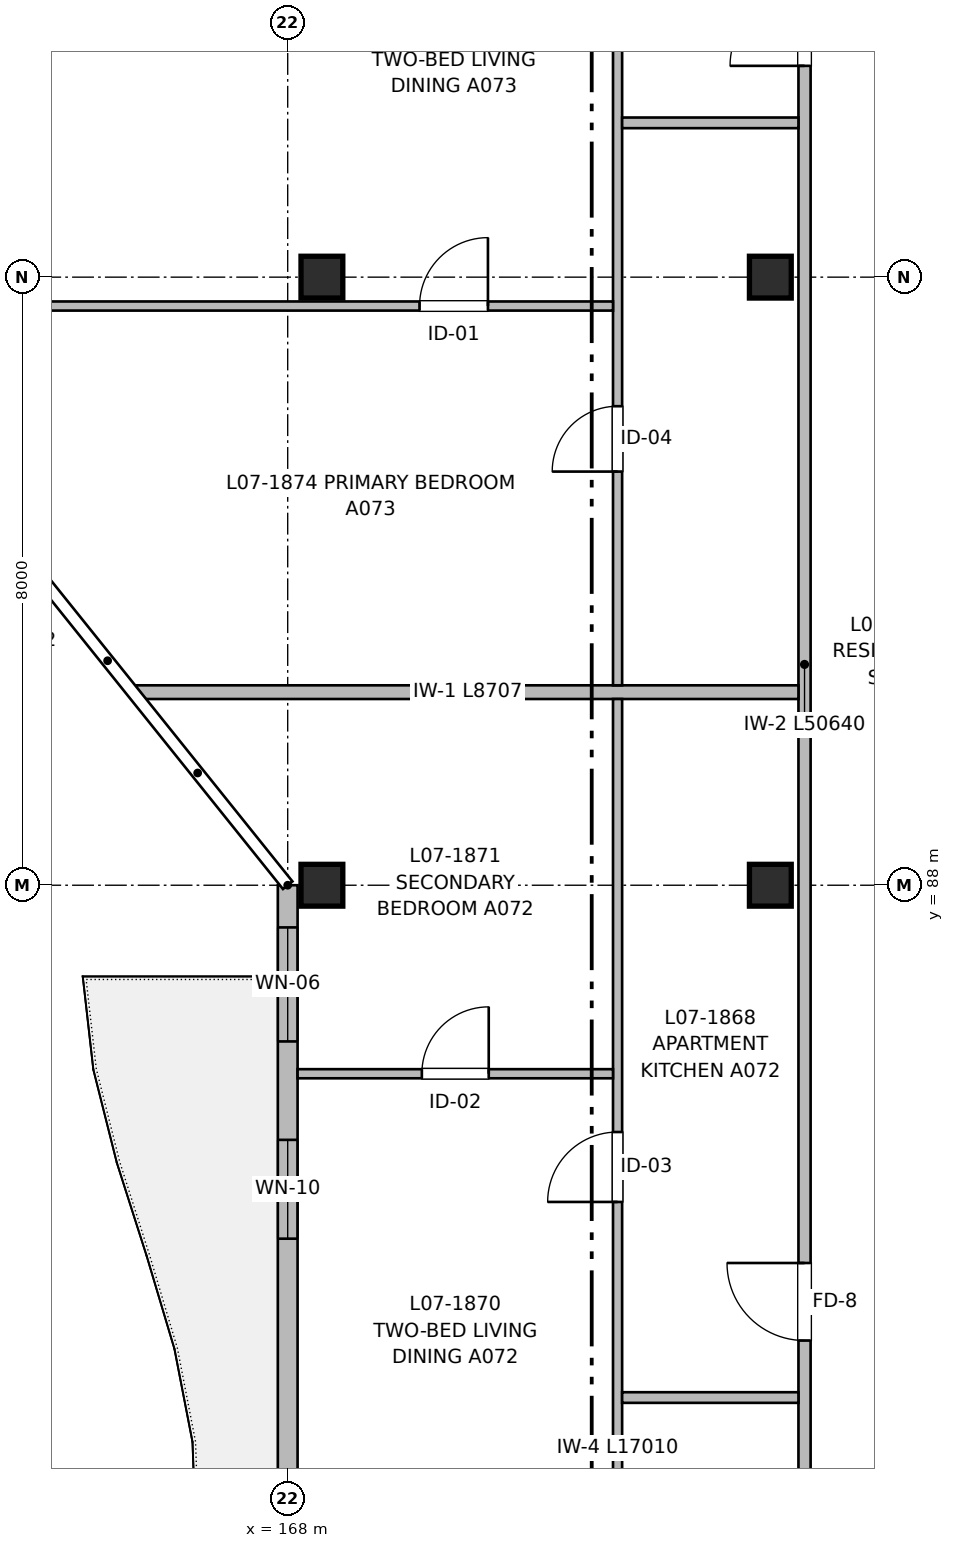
"""IFC4 building model, lengths in metres.
Left out: names, types, materials, properties, quantities, classifications, styles, units other than length and angle.
Written with IfcOpenShell. Run it as: python <this file> out.ifc"""

import sys

from ifc_helpers import new_model, si_unit, direction, frame, frame_2d, origin, origin_2d, place, context, subcontext, project, spatial, rectangle, extrude, element, fill, save


model = new_model("IFC4")
c1 = context("Model", 3, precision=1e-05, world=origin(), true_north=direction((0.0, 1.0)))
c2 = subcontext(c1, "Body", "Model", "MODEL_VIEW")
j1 = project(units=[si_unit("LENGTHUNIT", "METRE"), si_unit("PLANEANGLEUNIT", "RADIAN")], contexts=[c1])
p1 = place(None, origin())
s1 = spatial("IfcSite", under=j1, at=p1, CompositionType="ELEMENT")
p2 = place(p1, origin())
s2 = spatial("IfcBuilding", under=s1, at=p2, CompositionType="ELEMENT")
p3 = place(p2, frame((0.0, 0.0, 23.36)))
s3 = spatial("IfcBuildingStorey", under=s2, at=p3, CompositionType="ELEMENT", Elevation=23.36)
for number, where, z_axis, x_axis in (
    (1, (168.45, 88.0, 0.0), (0.0, 0.0, 1.0), (1.0, 0.0, 0.0)),
    (2, (168.45, 96.0, 0.0), (0.0, 0.0, 1.0), (1.0, 0.0, 0.0)),
    (3, (174.35, 88.0, 0.0), (0.0, 0.0, 1.0), (1.0, 0.0, 0.0)),
    (4, (174.35, 96.0, 0.0), (0.0, 0.0, 1.0), (1.0, 0.0, 0.0)),
):
    element("IfcColumn", number, at=place(p3, frame(where, z_axis=z_axis, x_axis=x_axis)), inside=s3, PredefinedType="COLUMN", context=c2, shape_type="SweptSolid", body=[
        extrude(rectangle(XDim=0.55, YDim=0.55, at=origin_2d()), origin(), (0.0, 0.0, 1.0), 3.2),
    ])
p4 = place(p3, frame((168.0, 56.0, 0.0), z_axis=(0.0, 0.0, 1.0), x_axis=(0.0, 1.0, 0.0)))
e5 = element("IfcWall", 5, at=p4, inside=s3, PredefinedType="SOLIDWALL", context=c2, shape_type="SweptSolid", body=[
    extrude(rectangle(XDim=32.0, YDim=0.26, at=frame_2d((16.0, 0.0))), origin(), (0.0, 0.0, 1.0), 2.98),
])
p5 = place(p4, frame((3.4, 0.0, 0.0)))
e6 = element("IfcOpeningElement", 6, at=p5, cuts=e5, PredefinedType="OPENING", context=c2, shape_type="SweptSolid", body=[
    extrude(rectangle(XDim=1.2, YDim=2.2, at=frame_2d((0.6, 1.1))), frame((0.0, 0.14, 0.0), z_axis=(0.0, -1.0, 0.0), x_axis=(1.0, 0.0, 0.0)), (0.0, 0.0, 1.0), 0.28),
])
p6 = place(p4, frame((5.75, 0.0, 0.77)))
e7 = element("IfcOpeningElement", 7, at=p6, cuts=e5, PredefinedType="OPENING", context=c2, shape_type="SweptSolid", body=[
    extrude(rectangle(XDim=1.45, YDim=1.45, at=frame_2d((0.725, 0.725))), frame((0.0, 0.14, 0.0), z_axis=(0.0, -1.0, 0.0), x_axis=(1.0, 0.0, 0.0)), (0.0, 0.0, 1.0), 0.28),
])
p7 = place(p4, frame((10.45, 0.0, 0.87)))
e8 = element("IfcOpeningElement", 8, at=p7, cuts=e5, PredefinedType="OPENING", context=c2, shape_type="SweptSolid", body=[
    extrude(rectangle(XDim=1.4, YDim=1.35, at=frame_2d((0.7, 0.675))), frame((0.0, 0.14, 0.0), z_axis=(0.0, -1.0, 0.0), x_axis=(1.0, 0.0, 0.0)), (0.0, 0.0, 1.0), 0.28),
])
p8 = place(p4, frame((19.375, 0.0, 0.87)))
e9 = element("IfcOpeningElement", 9, at=p8, cuts=e5, PredefinedType="OPENING", context=c2, shape_type="SweptSolid", body=[
    extrude(rectangle(XDim=1.25, YDim=1.35, at=frame_2d((0.625, 0.675))), frame((0.0, 0.14, 0.0), z_axis=(0.0, -1.0, 0.0), x_axis=(1.0, 0.0, 0.0)), (0.0, 0.0, 1.0), 0.28),
])
p9 = place(p4, frame((27.35, 0.0, 0.82)))
e10 = element("IfcOpeningElement", 10, at=p9, cuts=e5, PredefinedType="OPENING", context=c2, shape_type="SweptSolid", body=[
    extrude(rectangle(XDim=1.3, YDim=1.4, at=frame_2d((0.65, 0.7))), frame((0.0, 0.14, 0.0), z_axis=(0.0, -1.0, 0.0), x_axis=(1.0, 0.0, 0.0)), (0.0, 0.0, 1.0), 0.28),
])
p10 = place(p4, frame((14.055, 0.0, 0.82)))
e11 = element("IfcOpeningElement", 11, at=p10, cuts=e5, PredefinedType="OPENING", context=c2, shape_type="SweptSolid", body=[
    extrude(rectangle(XDim=1.5, YDim=1.4, at=frame_2d((0.75, 0.7))), frame((0.0, 0.14, 0.0), z_axis=(0.0, -1.0, 0.0), x_axis=(1.0, 0.0, 0.0)), (0.0, 0.0, 1.0), 0.28),
])
p11 = place(p4, frame((29.945, 0.0, 0.82)))
e12 = element("IfcOpeningElement", 12, at=p11, cuts=e5, PredefinedType="OPENING", context=c2, shape_type="SweptSolid", body=[
    extrude(rectangle(XDim=1.5, YDim=1.4, at=frame_2d((0.75, 0.7))), frame((0.0, 0.14, 0.0), z_axis=(0.0, -1.0, 0.0), x_axis=(1.0, 0.0, 0.0)), (0.0, 0.0, 1.0), 0.28),
])
p12 = place(p3, frame((174.8, 56.16, 0.0), z_axis=(0.0, 0.0, 1.0), x_axis=(0.0, 1.0, 0.0)))
e13 = element("IfcWall", 13, at=p12, inside=s3, PredefinedType="PARTITIONING", context=c2, shape_type="SweptSolid", body=[
    extrude(rectangle(XDim=50.64, YDim=0.16, at=frame_2d((25.32, 0.0))), origin(), (0.0, 0.0, 1.0), 2.935),
])
p13 = place(p12, frame((8.62, 0.0, 0.0)))
e14 = element("IfcOpeningElement", 14, at=p13, cuts=e13, PredefinedType="OPENING", context=c2, shape_type="SweptSolid", body=[
    extrude(rectangle(XDim=0.98, YDim=2.15, at=frame_2d((0.49, 1.075))), frame((0.0, 0.09, 0.0), z_axis=(0.0, -1.0, 0.0), x_axis=(1.0, 0.0, 0.0)), (0.0, 0.0, 1.0), 0.18),
])
p14 = place(p12, frame((25.85, 0.0, 0.0)))
e15 = element("IfcOpeningElement", 15, at=p14, cuts=e13, PredefinedType="OPENING", context=c2, shape_type="SweptSolid", body=[
    extrude(rectangle(XDim=1.02, YDim=2.15, at=frame_2d((0.51, 1.075))), frame((0.0, 0.09, 0.0), z_axis=(0.0, -1.0, 0.0), x_axis=(1.0, 0.0, 0.0)), (0.0, 0.0, 1.0), 0.18),
])
p15 = place(p12, frame((42.62, 0.0, 0.0)))
e16 = element("IfcOpeningElement", 16, at=p15, cuts=e13, PredefinedType="OPENING", context=c2, shape_type="SweptSolid", body=[
    extrude(rectangle(XDim=0.98, YDim=2.15, at=frame_2d((0.49, 1.075))), frame((0.0, 0.09, 0.0), z_axis=(0.0, -1.0, 0.0), x_axis=(1.0, 0.0, 0.0)), (0.0, 0.0, 1.0), 0.18),
])
p16 = place(p3, frame((166.013, 90.54, 0.0), z_axis=(0.0, 0.0, 1.0), x_axis=(1.0, 0.0, 0.0)))
e17 = element("IfcWall", 17, at=p16, inside=s3, PredefinedType="PARTITIONING", context=c2, shape_type="SweptSolid", body=[
    extrude(rectangle(XDim=8.707, YDim=0.18, at=frame_2d((4.353, 0.0))), origin(), (0.0, 0.0, 1.0), 2.935),
])
p17 = place(p3, frame((172.34, 73.44, 0.0), z_axis=(0.0, 0.0, 1.0), x_axis=(0.0, 1.0, 0.0)))
e18 = element("IfcWall", 18, at=p17, inside=s3, PredefinedType="PARTITIONING", context=c2, shape_type="SweptSolid", body=[
    extrude(rectangle(XDim=17.01, YDim=0.12, at=frame_2d((8.505, 0.0))), origin(), (0.0, 0.0, 1.0), 2.935),
])
p18 = place(p17, frame((2.972, 0.0, 0.0)))
e19 = element("IfcOpeningElement", 19, at=p18, cuts=e18, PredefinedType="OPENING", context=c2, shape_type="SweptSolid", body=[
    extrude(rectangle(XDim=0.94, YDim=2.1, at=frame_2d((0.47, 1.05))), frame((0.0, 0.07, 0.0), z_axis=(0.0, -1.0, 0.0), x_axis=(1.0, 0.0, 0.0)), (0.0, 0.0, 1.0), 0.14),
])
p19 = place(p17, frame((10.393, 0.0, 0.0)))
e20 = element("IfcOpeningElement", 20, at=p19, cuts=e18, PredefinedType="OPENING", context=c2, shape_type="SweptSolid", body=[
    extrude(rectangle(XDim=0.92, YDim=2.1, at=frame_2d((0.46, 1.05))), frame((0.0, 0.07, 0.0), z_axis=(0.0, -1.0, 0.0), x_axis=(1.0, 0.0, 0.0)), (0.0, 0.0, 1.0), 0.14),
])
p20 = place(p3, frame((172.4, 81.26, 0.0), z_axis=(0.0, 0.0, 1.0), x_axis=(1.0, 0.0, 0.0)))
e21 = element("IfcWall", 21, at=p20, inside=s3, PredefinedType="PARTITIONING", context=c2, shape_type="SweptSolid", body=[
    extrude(rectangle(XDim=2.32, YDim=0.14, at=frame_2d((1.16, 0.0))), origin(), (0.0, 0.0, 1.0), 2.935),
])
p21 = place(p3, frame((168.13, 85.52, 0.0), z_axis=(0.0, 0.0, 1.0), x_axis=(1.0, 0.0, 0.0)))
e22 = element("IfcWall", 22, at=p21, inside=s3, PredefinedType="PARTITIONING", context=c2, shape_type="SweptSolid", body=[
    extrude(rectangle(XDim=4.15, YDim=0.12, at=frame_2d((2.075, 0.0))), origin(), (0.0, 0.0, 1.0), 2.935),
])
p22 = place(p21, frame((1.635, 0.0, 0.0)))
e23 = element("IfcOpeningElement", 23, at=p22, cuts=e22, PredefinedType="OPENING", context=c2, shape_type="SweptSolid", body=[
    extrude(rectangle(XDim=0.88, YDim=2.1, at=frame_2d((0.44, 1.05))), frame((0.0, 0.07, 0.0), z_axis=(0.0, -1.0, 0.0), x_axis=(1.0, 0.0, 0.0)), (0.0, 0.0, 1.0), 0.14),
])
p23 = place(p3, frame((172.34, 90.63, 0.0), z_axis=(0.0, 0.0, 1.0), x_axis=(0.0, 1.0, 0.0)))
e24 = element("IfcWall", 24, at=p23, inside=s3, PredefinedType="PARTITIONING", context=c2, shape_type="SweptSolid", body=[
    extrude(rectangle(XDim=16.09, YDim=0.12, at=frame_2d((8.045, 0.0))), origin(), (0.0, 0.0, 1.0), 2.935),
])
p24 = place(p23, frame((2.812, 0.0, 0.0)))
e25 = element("IfcOpeningElement", 25, at=p24, cuts=e24, PredefinedType="OPENING", context=c2, shape_type="SweptSolid", body=[
    extrude(rectangle(XDim=0.86, YDim=2.1, at=frame_2d((0.43, 1.05))), frame((0.0, 0.07, 0.0), z_axis=(0.0, -1.0, 0.0), x_axis=(1.0, 0.0, 0.0)), (0.0, 0.0, 1.0), 0.14),
])
p25 = place(p23, frame((9.833, 0.0, 0.0)))
e26 = element("IfcOpeningElement", 26, at=p25, cuts=e24, PredefinedType="OPENING", context=c2, shape_type="SweptSolid", body=[
    extrude(rectangle(XDim=0.92, YDim=2.1, at=frame_2d((0.46, 1.05))), frame((0.0, 0.07, 0.0), z_axis=(0.0, -1.0, 0.0), x_axis=(1.0, 0.0, 0.0)), (0.0, 0.0, 1.0), 0.14),
])
p26 = place(p3, frame((172.4, 98.03, 0.0), z_axis=(0.0, 0.0, 1.0), x_axis=(1.0, 0.0, 0.0)))
e27 = element("IfcWall", 27, at=p26, inside=s3, PredefinedType="PARTITIONING", context=c2, shape_type="SweptSolid", body=[
    extrude(rectangle(XDim=2.32, YDim=0.14, at=frame_2d((1.16, 0.0))), origin(), (0.0, 0.0, 1.0), 2.935),
])
p27 = place(p3, frame((161.312, 95.62, 0.0), z_axis=(0.0, 0.0, 1.0), x_axis=(1.0, 0.0, 0.0)))
e28 = element("IfcWall", 28, at=p27, inside=s3, PredefinedType="PARTITIONING", context=c2, shape_type="SweptSolid", body=[
    extrude(rectangle(XDim=10.968, YDim=0.12, at=frame_2d((5.484, 0.0))), origin(), (0.0, 0.0, 1.0), 2.935),
])
p28 = place(p27, frame((8.422, 0.0, 0.0)))
e29 = element("IfcOpeningElement", 29, at=p28, cuts=e28, PredefinedType="OPENING", context=c2, shape_type="SweptSolid", body=[
    extrude(rectangle(XDim=0.9, YDim=2.1, at=frame_2d((0.45, 1.05))), frame((0.0, 0.07, 0.0), z_axis=(0.0, -1.0, 0.0), x_axis=(1.0, 0.0, 0.0)), (0.0, 0.0, 1.0), 0.14),
])
p29 = place(p9, origin())
e30 = element("IfcWindow", 30, at=p29, inside=s3, PartitioningType="SINGLE_PANEL", PredefinedType="WINDOW", context=c2, shape_type="SweptSolid", body=[
    extrude(rectangle(XDim=1.3, YDim=1.4, at=frame_2d((0.65, 0.7))), frame((0.0, 0.03, 0.0), z_axis=(0.0, -1.0, 0.0), x_axis=(1.0, 0.0, 0.0)), (0.0, 0.0, 1.0), 0.06),
])
fill(e10, e30)
p30 = place(p19, origin())
e31 = element("IfcDoor", 31, at=p30, inside=s3, OperationType="SINGLE_SWING_LEFT", PredefinedType="DOOR", context=c2, shape_type="SweptSolid", body=[
    extrude(rectangle(XDim=0.92, YDim=2.1, at=frame_2d((0.46, 1.05))), frame((0.0, 0.025, 0.0), z_axis=(0.0, -1.0, 0.0), x_axis=(1.0, 0.0, 0.0)), (0.0, 0.0, 1.0), 0.05),
])
fill(e20, e31)
p31 = place(p14, origin())
e32 = element("IfcDoor", 32, at=p31, inside=s3, OperationType="SINGLE_SWING_RIGHT", PredefinedType="DOOR", context=c2, shape_type="SweptSolid", body=[
    extrude(rectangle(XDim=1.02, YDim=2.15, at=frame_2d((0.51, 1.075))), frame((0.0, 0.025, 0.0), z_axis=(0.0, -1.0, 0.0), x_axis=(1.0, 0.0, 0.0)), (0.0, 0.0, 1.0), 0.05),
])
fill(e15, e32)
p32 = place(p22, origin())
e33 = element("IfcDoor", 33, at=p32, inside=s3, OperationType="SINGLE_SWING_RIGHT", PredefinedType="DOOR", context=c2, shape_type="SweptSolid", body=[
    extrude(rectangle(XDim=0.88, YDim=2.1, at=frame_2d((0.44, 1.05))), frame((0.0, 0.025, 0.0), z_axis=(0.0, -1.0, 0.0), x_axis=(1.0, 0.0, 0.0)), (0.0, 0.0, 1.0), 0.05),
])
fill(e23, e33)
p33 = place(p24, origin())
e34 = element("IfcDoor", 34, at=p33, inside=s3, OperationType="SINGLE_SWING_LEFT", PredefinedType="DOOR", context=c2, shape_type="SweptSolid", body=[
    extrude(rectangle(XDim=0.86, YDim=2.1, at=frame_2d((0.43, 1.05))), frame((0.0, 0.025, 0.0), z_axis=(0.0, -1.0, 0.0), x_axis=(1.0, 0.0, 0.0)), (0.0, 0.0, 1.0), 0.05),
])
fill(e25, e34)
p34 = place(p15, origin())
e35 = element("IfcDoor", 35, at=p34, inside=s3, OperationType="SINGLE_SWING_LEFT", PredefinedType="DOOR", context=c2, shape_type="SweptSolid", body=[
    extrude(rectangle(XDim=0.98, YDim=2.15, at=frame_2d((0.49, 1.075))), frame((0.0, 0.025, 0.0), z_axis=(0.0, -1.0, 0.0), x_axis=(1.0, 0.0, 0.0)), (0.0, 0.0, 1.0), 0.05),
])
fill(e16, e35)
p35 = place(p28, origin())
e36 = element("IfcDoor", 36, at=p35, inside=s3, OperationType="SINGLE_SWING_RIGHT", PredefinedType="DOOR", context=c2, shape_type="SweptSolid", body=[
    extrude(rectangle(XDim=0.9, YDim=2.1, at=frame_2d((0.45, 1.05))), frame((0.0, 0.025, 0.0), z_axis=(0.0, -1.0, 0.0), x_axis=(1.0, 0.0, 0.0)), (0.0, 0.0, 1.0), 0.05),
])
fill(e29, e36)
p36 = place(p11, origin())
e37 = element("IfcWindow", 37, at=p36, inside=s3, PartitioningType="SINGLE_PANEL", PredefinedType="WINDOW", context=c2, shape_type="SweptSolid", body=[
    extrude(rectangle(XDim=1.5, YDim=1.4, at=frame_2d((0.75, 0.7))), frame((0.0, 0.03, 0.0), z_axis=(0.0, -1.0, 0.0), x_axis=(1.0, 0.0, 0.0)), (0.0, 0.0, 1.0), 0.06),
])
fill(e12, e37)
save(model, sys.argv[1])
